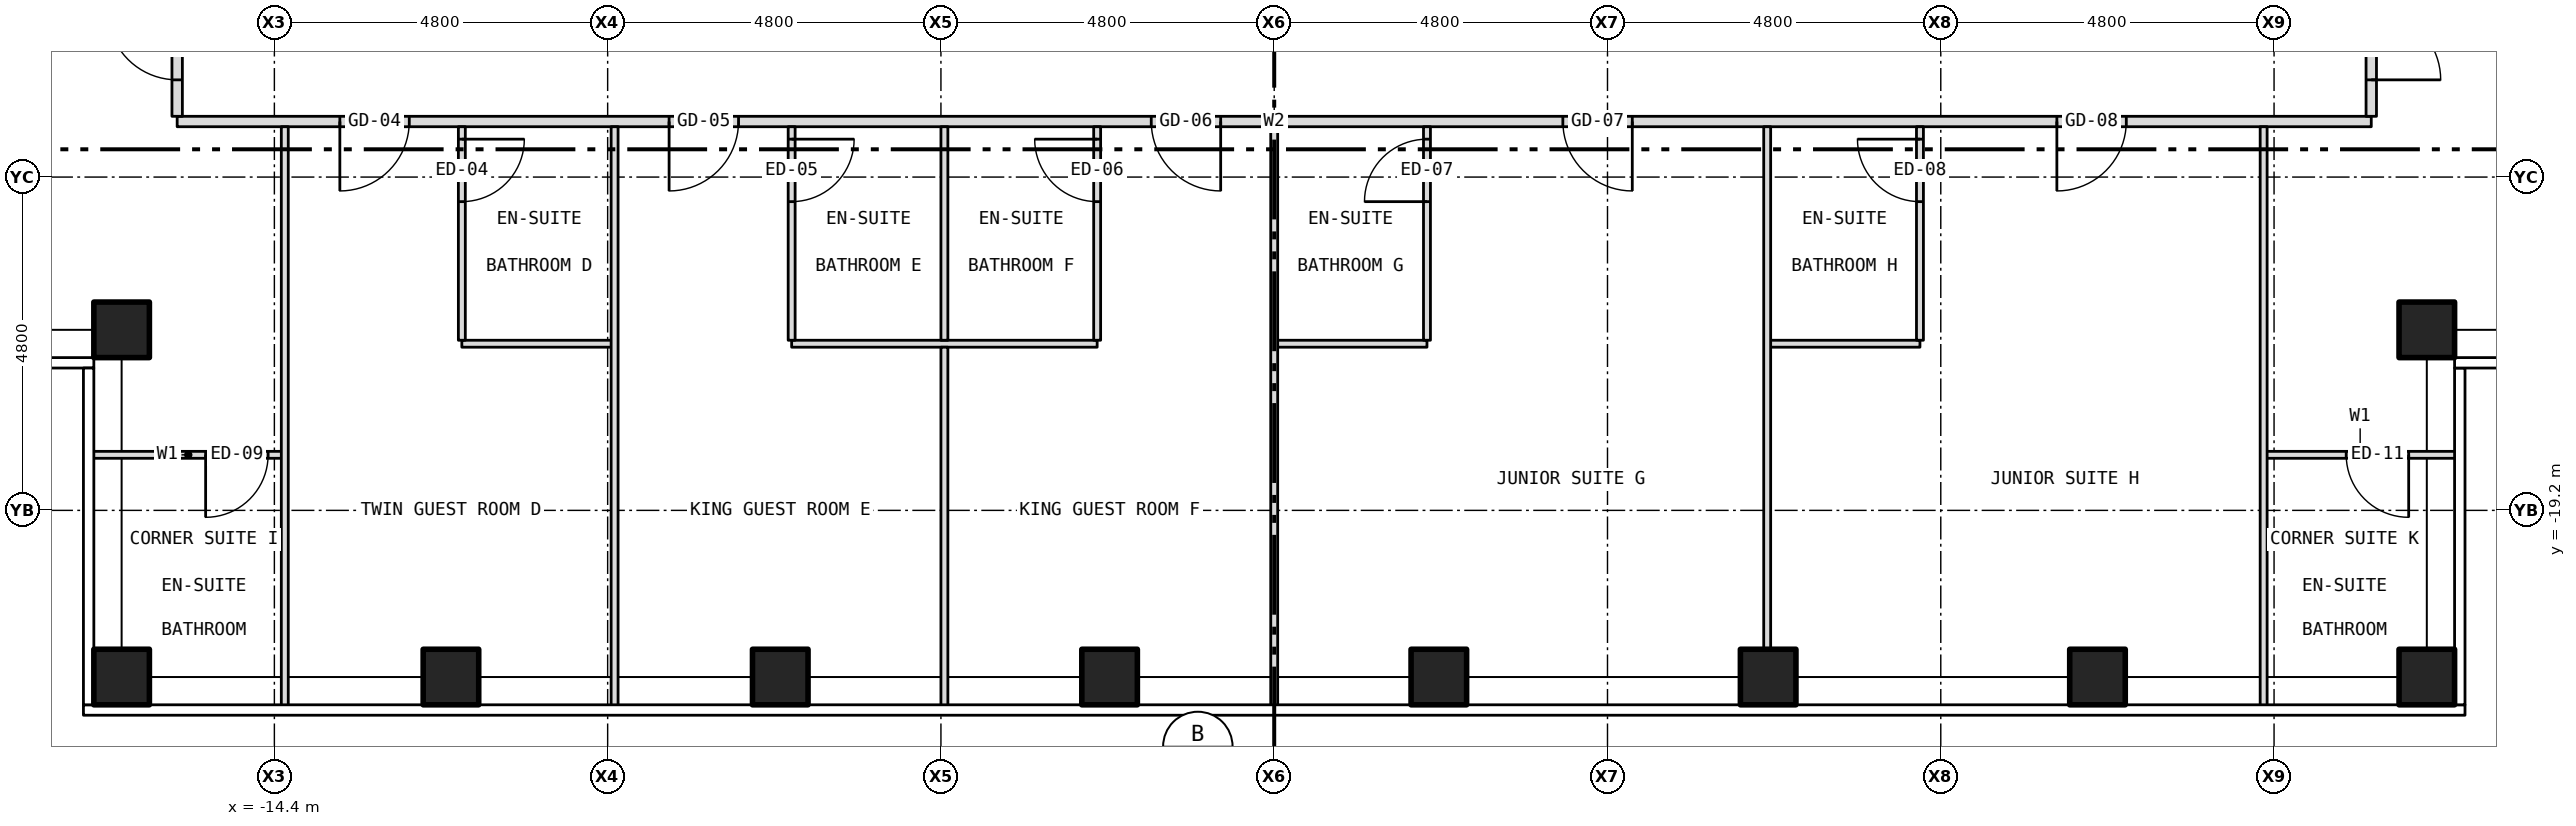
"""IFC4 building model, lengths in metres.
Left out: names, types, materials, properties, quantities, classifications, styles, units other than length and angle.
Written with IfcOpenShell. Run it as: python <this file> out.ifc"""

import sys

from ifc_helpers import new_model, si_unit, direction, frame, frame_2d, origin, origin_2d, place, context, subcontext, project, spatial, rectangle, hollow_rectangle, extrude, element, fill, save


model = new_model("IFC4")
c1 = context("Model", 3, precision=1e-05, world=origin(), true_north=direction((0.0, 1.0)))
c2 = subcontext(c1, "Body", "Model", "MODEL_VIEW")
j1 = project(units=[si_unit("LENGTHUNIT", "METRE"), si_unit("PLANEANGLEUNIT", "RADIAN")], contexts=[c1])
p1 = place(None, origin())
s1 = spatial("IfcSite", under=j1, at=p1, CompositionType="ELEMENT")
p2 = place(p1, origin())
s2 = spatial("IfcBuilding", under=s1, at=p2, CompositionType="ELEMENT")
p3 = place(p2, frame((0.0, 0.0, 148.0)))
s3 = spatial("IfcBuildingStorey", under=s2, at=p3, CompositionType="ELEMENT", Elevation=148.0)
for number, where, z_axis, x_axis in (
    (1, (-16.6, -21.6, -0.15), (0.0, 0.0, 1.0), (1.0, 0.0, 0.0)),
    (2, (-11.857, -21.6, -0.15), (0.0, 0.0, 1.0), (1.0, 0.0, 0.0)),
    (3, (-7.114, -21.6, -0.15), (0.0, 0.0, 1.0), (1.0, 0.0, 0.0)),
    (4, (-2.371, -21.6, -0.15), (0.0, 0.0, 1.0), (1.0, 0.0, 0.0)),
    (5, (2.371, -21.6, -0.15), (0.0, 0.0, 1.0), (1.0, 0.0, 0.0)),
    (6, (7.114, -21.6, -0.15), (0.0, 0.0, 1.0), (1.0, 0.0, 0.0)),
    (7, (11.857, -21.6, -0.15), (0.0, 0.0, 1.0), (1.0, 0.0, 0.0)),
    (8, (16.6, -21.6, -0.15), (0.0, 0.0, 1.0), (1.0, 0.0, 0.0)),
    (9, (-16.6, -16.6, -0.15), (0.0, 0.0, 1.0), (1.0, 0.0, 0.0)),
    (10, (16.6, -16.6, -0.15), (0.0, 0.0, 1.0), (1.0, 0.0, 0.0)),
):
    element("IfcColumn", number, at=place(p3, frame(where, z_axis=z_axis, x_axis=x_axis)), inside=s3, PredefinedType="COLUMN", context=c2, shape_type="SweptSolid", body=[
        extrude(hollow_rectangle(XDim=0.8, YDim=0.8, WallThickness=0.045, at=origin_2d()), origin(), (0.0, 0.0, 1.0), 3.5),
    ])
p4 = place(p3, frame((-17.03, -18.4, 0.0), z_axis=(0.0, 0.0, 1.0), x_axis=(1.0, 0.0, 0.0)))
e11 = element("IfcWall", 11, at=p4, inside=s3, PredefinedType="PARTITIONING", context=c2, shape_type="SweptSolid", body=[
    extrude(rectangle(XDim=2.78, YDim=0.1, at=frame_2d((1.39, 0.0))), origin(), (0.0, 0.0, 1.0), 3.35),
])
p5 = place(p4, frame((1.64, 0.0, 0.0)))
e12 = element("IfcOpeningElement", 12, at=p5, cuts=e11, PredefinedType="OPENING", context=c2, shape_type="SweptSolid", body=[
    extrude(rectangle(XDim=0.9, YDim=2.1, at=frame_2d((0.45, 1.05))), frame((0.0, 0.062, 0.0), z_axis=(0.0, -1.0, 0.0), x_axis=(1.0, 0.0, 0.0)), (0.0, 0.0, 1.0), 0.124),
])
p6 = place(p3, frame((14.25, -18.4, 0.0), z_axis=(0.0, 0.0, 1.0), x_axis=(1.0, 0.0, 0.0)))
e13 = element("IfcWall", 13, at=p6, inside=s3, PredefinedType="PARTITIONING", context=c2, shape_type="SweptSolid", body=[
    extrude(rectangle(XDim=2.78, YDim=0.1, at=frame_2d((1.39, 0.0))), origin(), (0.0, 0.0, 1.0), 3.35),
])
p7 = place(p6, frame((1.189, 0.0, 0.0)))
e14 = element("IfcOpeningElement", 14, at=p7, cuts=e13, PredefinedType="OPENING", context=c2, shape_type="SweptSolid", body=[
    extrude(rectangle(XDim=0.9, YDim=2.1, at=frame_2d((0.45, 1.05))), frame((0.0, 0.062, 0.0), z_axis=(0.0, -1.0, 0.0), x_axis=(1.0, 0.0, 0.0)), (0.0, 0.0, 1.0), 0.124),
])
p8 = place(p3, frame((-11.7, -16.8, 0.0), z_axis=(0.0, 0.0, 1.0), x_axis=(1.0, 0.0, 0.0)))
e15 = element("IfcWall", 15, at=p8, inside=s3, PredefinedType="PARTITIONING", context=c2, shape_type="SweptSolid", body=[
    extrude(rectangle(XDim=2.2, YDim=0.1, at=frame_2d((1.1, 0.0))), origin(), (0.0, 0.0, 1.0), 3.35),
])
p9 = place(p3, frame((-6.95, -16.8, 0.0), z_axis=(0.0, 0.0, 1.0), x_axis=(1.0, 0.0, 0.0)))
e16 = element("IfcWall", 16, at=p9, inside=s3, PredefinedType="PARTITIONING", context=c2, shape_type="SweptSolid", body=[
    extrude(rectangle(XDim=4.4, YDim=0.1, at=frame_2d((2.2, 0.0))), origin(), (0.0, 0.0, 1.0), 3.35),
])
for number, where, z_axis, x_axis in (
    (17, (0.0, -16.8, 0.0), (0.0, 0.0, 1.0), (1.0, 0.0, 0.0)),
    (18, (7.1, -16.8, 0.0), (0.0, 0.0, 1.0), (1.0, 0.0, 0.0)),
):
    element("IfcWall", number, at=place(p3, frame(where, z_axis=z_axis, x_axis=x_axis)), inside=s3, PredefinedType="PARTITIONING", context=c2, shape_type="SweptSolid", body=[
        extrude(rectangle(XDim=2.2, YDim=0.1, at=frame_2d((1.1, 0.0))), origin(), (0.0, 0.0, 1.0), 3.35),
    ])
p10 = place(p3, frame((-15.8, -13.6, 0.0), z_axis=(0.0, 0.0, 1.0), x_axis=(1.0, 0.0, 0.0)))
e19 = element("IfcWall", 19, at=p10, inside=s3, PredefinedType="PARTITIONING", context=c2, shape_type="SweptSolid", body=[
    extrude(rectangle(XDim=31.6, YDim=0.15, at=frame_2d((15.8, 0.0))), origin(), (0.0, 0.0, 1.0), 3.35),
])
p11 = place(p10, frame((2.343, 0.0, 0.0)))
e20 = element("IfcOpeningElement", 20, at=p11, cuts=e19, PredefinedType="OPENING", context=c2, shape_type="SweptSolid", body=[
    extrude(rectangle(XDim=1.0, YDim=2.1, at=frame_2d((0.5, 1.05))), frame((0.0, 0.087, 0.0), z_axis=(0.0, -1.0, 0.0), x_axis=(1.0, 0.0, 0.0)), (0.0, 0.0, 1.0), 0.174),
])
p12 = place(p10, frame((7.085, 0.0, 0.0)))
e21 = element("IfcOpeningElement", 21, at=p12, cuts=e19, PredefinedType="OPENING", context=c2, shape_type="SweptSolid", body=[
    extrude(rectangle(XDim=1.0, YDim=2.1, at=frame_2d((0.5, 1.05))), frame((0.0, 0.087, 0.0), z_axis=(0.0, -1.0, 0.0), x_axis=(1.0, 0.0, 0.0)), (0.0, 0.0, 1.0), 0.174),
])
p13 = place(p10, frame((14.029, 0.0, 0.0)))
e22 = element("IfcOpeningElement", 22, at=p13, cuts=e19, PredefinedType="OPENING", context=c2, shape_type="SweptSolid", body=[
    extrude(rectangle(XDim=1.0, YDim=2.1, at=frame_2d((0.5, 1.05))), frame((0.0, 0.087, 0.0), z_axis=(0.0, -1.0, 0.0), x_axis=(1.0, 0.0, 0.0)), (0.0, 0.0, 1.0), 0.174),
])
p14 = place(p10, frame((19.957, 0.0, 0.0)))
e23 = element("IfcOpeningElement", 23, at=p14, cuts=e19, PredefinedType="OPENING", context=c2, shape_type="SweptSolid", body=[
    extrude(rectangle(XDim=1.0, YDim=2.1, at=frame_2d((0.5, 1.05))), frame((0.0, 0.087, 0.0), z_axis=(0.0, -1.0, 0.0), x_axis=(1.0, 0.0, 0.0)), (0.0, 0.0, 1.0), 0.174),
])
p15 = place(p10, frame((27.072, 0.0, 0.0)))
e24 = element("IfcOpeningElement", 24, at=p15, cuts=e19, PredefinedType="OPENING", context=c2, shape_type="SweptSolid", body=[
    extrude(rectangle(XDim=1.0, YDim=2.1, at=frame_2d((0.5, 1.05))), frame((0.0, 0.087, 0.0), z_axis=(0.0, -1.0, 0.0), x_axis=(1.0, 0.0, 0.0)), (0.0, 0.0, 1.0), 0.174),
])
p16 = place(p3, frame((-15.8, -13.525, 0.0), z_axis=(0.0, 0.0, 1.0), x_axis=(0.0, 1.0, 0.0)))
e25 = element("IfcWall", 25, at=p16, inside=s3, PredefinedType="PARTITIONING", context=c2, shape_type="SweptSolid", body=[
    extrude(rectangle(XDim=2.605, YDim=0.15, at=frame_2d((1.302, 0.0))), origin(), (0.0, 0.0, 1.0), 3.35),
])
p17 = place(p16, frame((0.525, 0.0, 0.0)))
e26 = element("IfcOpeningElement", 26, at=p17, cuts=e25, PredefinedType="OPENING", context=c2, shape_type="SweptSolid", body=[
    extrude(rectangle(XDim=1.0, YDim=2.1, at=frame_2d((0.5, 1.05))), frame((0.0, 0.087, 0.0), z_axis=(0.0, -1.0, 0.0), x_axis=(1.0, 0.0, 0.0)), (0.0, 0.0, 1.0), 0.174),
])
p18 = place(p3, frame((-14.25, -22.03, 0.0), z_axis=(0.0, 0.0, 1.0), x_axis=(0.0, 1.0, 0.0)))
e27 = element("IfcWall", 27, at=p18, inside=s3, PredefinedType="PARTITIONING", context=c2, shape_type="SweptSolid", body=[
    extrude(rectangle(XDim=8.355, YDim=0.1, at=frame_2d((4.177, 0.0))), origin(), (0.0, 0.0, 1.0), 2.817),
])
p19 = place(p3, frame((-11.7, -16.75, 0.0), z_axis=(0.0, 0.0, 1.0), x_axis=(0.0, 1.0, 0.0)))
e28 = element("IfcWall", 28, at=p19, inside=s3, PredefinedType="PARTITIONING", context=c2, shape_type="SweptSolid", body=[
    extrude(rectangle(XDim=3.075, YDim=0.1, at=frame_2d((1.538, 0.0))), origin(), (0.0, 0.0, 1.0), 3.35),
])
p20 = place(p19, frame((1.996, 0.0, 0.0)))
e29 = element("IfcOpeningElement", 29, at=p20, cuts=e28, PredefinedType="OPENING", context=c2, shape_type="SweptSolid", body=[
    extrude(rectangle(XDim=0.9, YDim=2.1, at=frame_2d((0.45, 1.05))), frame((0.0, 0.062, 0.0), z_axis=(0.0, -1.0, 0.0), x_axis=(1.0, 0.0, 0.0)), (0.0, 0.0, 1.0), 0.124),
])
p21 = place(p3, frame((-9.5, -22.03, 0.0), z_axis=(0.0, 0.0, 1.0), x_axis=(0.0, 1.0, 0.0)))
e30 = element("IfcWall", 30, at=p21, inside=s3, PredefinedType="PARTITIONING", context=c2, shape_type="SweptSolid", body=[
    extrude(rectangle(XDim=8.355, YDim=0.1, at=frame_2d((4.177, 0.0))), origin(), (0.0, 0.0, 1.0), 2.728),
])
p22 = place(p3, frame((-6.95, -16.75, 0.0), z_axis=(0.0, 0.0, 1.0), x_axis=(0.0, 1.0, 0.0)))
e31 = element("IfcWall", 31, at=p22, inside=s3, PredefinedType="PARTITIONING", context=c2, shape_type="SweptSolid", body=[
    extrude(rectangle(XDim=3.075, YDim=0.1, at=frame_2d((1.538, 0.0))), origin(), (0.0, 0.0, 1.0), 3.35),
])
p23 = place(p22, frame((1.996, 0.0, 0.0)))
e32 = element("IfcOpeningElement", 32, at=p23, cuts=e31, PredefinedType="OPENING", context=c2, shape_type="SweptSolid", body=[
    extrude(rectangle(XDim=0.9, YDim=2.1, at=frame_2d((0.45, 1.05))), frame((0.0, 0.062, 0.0), z_axis=(0.0, -1.0, 0.0), x_axis=(1.0, 0.0, 0.0)), (0.0, 0.0, 1.0), 0.124),
])
p24 = place(p3, frame((-4.75, -22.03, 0.0), z_axis=(0.0, 0.0, 1.0), x_axis=(0.0, 1.0, 0.0)))
e33 = element("IfcWall", 33, at=p24, inside=s3, PredefinedType="PARTITIONING", context=c2, shape_type="SweptSolid", body=[
    extrude(rectangle(XDim=5.18, YDim=0.1, at=frame_2d((2.59, 0.0))), origin(), (0.0, 0.0, 1.0), 2.817),
])
p25 = place(p3, frame((-4.75, -16.75, 0.0), z_axis=(0.0, 0.0, 1.0), x_axis=(0.0, 1.0, 0.0)))
e34 = element("IfcWall", 34, at=p25, inside=s3, PredefinedType="PARTITIONING", context=c2, shape_type="SweptSolid", body=[
    extrude(rectangle(XDim=3.075, YDim=0.1, at=frame_2d((1.538, 0.0))), origin(), (0.0, 0.0, 1.0), 2.817),
])
p26 = place(p3, frame((-2.55, -16.75, 0.0), z_axis=(0.0, 0.0, 1.0), x_axis=(0.0, 1.0, 0.0)))
e35 = element("IfcWall", 35, at=p26, inside=s3, PredefinedType="PARTITIONING", context=c2, shape_type="SweptSolid", body=[
    extrude(rectangle(XDim=3.075, YDim=0.1, at=frame_2d((1.538, 0.0))), origin(), (0.0, 0.0, 1.0), 3.35),
])
p27 = place(p26, frame((1.996, 0.0, 0.0)))
e36 = element("IfcOpeningElement", 36, at=p27, cuts=e35, PredefinedType="OPENING", context=c2, shape_type="SweptSolid", body=[
    extrude(rectangle(XDim=0.9, YDim=2.1, at=frame_2d((0.45, 1.05))), frame((0.0, 0.062, 0.0), z_axis=(0.0, -1.0, 0.0), x_axis=(1.0, 0.0, 0.0)), (0.0, 0.0, 1.0), 0.124),
])
p28 = place(p3, frame((0.0, -22.03, 0.0), z_axis=(0.0, 0.0, 1.0), x_axis=(0.0, 1.0, 0.0)))
e37 = element("IfcWall", 37, at=p28, inside=s3, PredefinedType="PARTITIONING", context=c2, shape_type="SweptSolid", body=[
    extrude(rectangle(XDim=8.355, YDim=0.1, at=frame_2d((4.177, 0.0))), origin(), (0.0, 0.0, 1.0), 2.728),
])
p29 = place(p3, frame((2.2, -16.75, 0.0), z_axis=(0.0, 0.0, 1.0), x_axis=(0.0, 1.0, 0.0)))
e38 = element("IfcWall", 38, at=p29, inside=s3, PredefinedType="PARTITIONING", context=c2, shape_type="SweptSolid", body=[
    extrude(rectangle(XDim=3.075, YDim=0.1, at=frame_2d((1.538, 0.0))), origin(), (0.0, 0.0, 1.0), 3.35),
])
p30 = place(p29, frame((1.996, 0.0, 0.0)))
e39 = element("IfcOpeningElement", 39, at=p30, cuts=e38, PredefinedType="OPENING", context=c2, shape_type="SweptSolid", body=[
    extrude(rectangle(XDim=0.9, YDim=2.1, at=frame_2d((0.45, 1.05))), frame((0.0, 0.062, 0.0), z_axis=(0.0, -1.0, 0.0), x_axis=(1.0, 0.0, 0.0)), (0.0, 0.0, 1.0), 0.124),
])
p31 = place(p3, frame((7.1, -21.48, 0.0), z_axis=(0.0, 0.0, 1.0), x_axis=(0.0, 1.0, 0.0)))
e40 = element("IfcWall", 40, at=p31, inside=s3, PredefinedType="PARTITIONING", context=c2, shape_type="SweptSolid", body=[
    extrude(rectangle(XDim=7.805, YDim=0.1, at=frame_2d((3.902, 0.0))), origin(), (0.0, 0.0, 1.0), 3.35),
])
p32 = place(p3, frame((9.3, -16.75, 0.0), z_axis=(0.0, 0.0, 1.0), x_axis=(0.0, 1.0, 0.0)))
e41 = element("IfcWall", 41, at=p32, inside=s3, PredefinedType="PARTITIONING", context=c2, shape_type="SweptSolid", body=[
    extrude(rectangle(XDim=3.075, YDim=0.1, at=frame_2d((1.538, 0.0))), origin(), (0.0, 0.0, 1.0), 3.35),
])
p33 = place(p32, frame((1.996, 0.0, 0.0)))
e42 = element("IfcOpeningElement", 42, at=p33, cuts=e41, PredefinedType="OPENING", context=c2, shape_type="SweptSolid", body=[
    extrude(rectangle(XDim=0.9, YDim=2.1, at=frame_2d((0.45, 1.05))), frame((0.0, 0.062, 0.0), z_axis=(0.0, -1.0, 0.0), x_axis=(1.0, 0.0, 0.0)), (0.0, 0.0, 1.0), 0.124),
])
p34 = place(p3, frame((14.25, -22.03, 0.0), z_axis=(0.0, 0.0, 1.0), x_axis=(0.0, 1.0, 0.0)))
e43 = element("IfcWall", 43, at=p34, inside=s3, PredefinedType="PARTITIONING", context=c2, shape_type="SweptSolid", body=[
    extrude(rectangle(XDim=8.355, YDim=0.1, at=frame_2d((4.177, 0.0))), origin(), (0.0, 0.0, 1.0), 2.817),
])
p35 = place(p3, frame((15.8, -13.525, 0.0), z_axis=(0.0, 0.0, 1.0), x_axis=(0.0, 1.0, 0.0)))
e44 = element("IfcWall", 44, at=p35, inside=s3, PredefinedType="PARTITIONING", context=c2, shape_type="SweptSolid", body=[
    extrude(rectangle(XDim=2.605, YDim=0.15, at=frame_2d((1.302, 0.0))), origin(), (0.0, 0.0, 1.0), 3.35),
])
p36 = place(p35, frame((0.525, 0.0, 0.0)))
e45 = element("IfcOpeningElement", 45, at=p36, cuts=e44, PredefinedType="OPENING", context=c2, shape_type="SweptSolid", body=[
    extrude(rectangle(XDim=1.0, YDim=2.1, at=frame_2d((0.5, 1.05))), frame((0.0, 0.087, 0.0), z_axis=(0.0, -1.0, 0.0), x_axis=(1.0, 0.0, 0.0)), (0.0, 0.0, 1.0), 0.174),
])
p37 = place(p11, origin())
e46 = element("IfcDoor", 46, at=p37, inside=s3, OperationType="SINGLE_SWING_LEFT", PredefinedType="DOOR", context=c2, shape_type="SweptSolid", body=[
    extrude(rectangle(XDim=1.0, YDim=2.1, at=frame_2d((0.5, 1.05))), frame((0.0, 0.025, 0.0), z_axis=(0.0, -1.0, 0.0), x_axis=(1.0, 0.0, 0.0)), (0.0, 0.0, 1.0), 0.05),
])
fill(e20, e46)
p38 = place(p20, origin())
e47 = element("IfcDoor", 47, at=p38, inside=s3, OperationType="SINGLE_SWING_RIGHT", PredefinedType="DOOR", context=c2, shape_type="SweptSolid", body=[
    extrude(rectangle(XDim=0.9, YDim=2.1, at=frame_2d((0.45, 1.05))), frame((0.0, 0.025, 0.0), z_axis=(0.0, -1.0, 0.0), x_axis=(1.0, 0.0, 0.0)), (0.0, 0.0, 1.0), 0.05),
])
fill(e29, e47)
p39 = place(p12, origin())
e48 = element("IfcDoor", 48, at=p39, inside=s3, OperationType="SINGLE_SWING_LEFT", PredefinedType="DOOR", context=c2, shape_type="SweptSolid", body=[
    extrude(rectangle(XDim=1.0, YDim=2.1, at=frame_2d((0.5, 1.05))), frame((0.0, 0.025, 0.0), z_axis=(0.0, -1.0, 0.0), x_axis=(1.0, 0.0, 0.0)), (0.0, 0.0, 1.0), 0.05),
])
fill(e21, e48)
p40 = place(p23, origin())
e49 = element("IfcDoor", 49, at=p40, inside=s3, OperationType="SINGLE_SWING_RIGHT", PredefinedType="DOOR", context=c2, shape_type="SweptSolid", body=[
    extrude(rectangle(XDim=0.9, YDim=2.1, at=frame_2d((0.45, 1.05))), frame((0.0, 0.025, 0.0), z_axis=(0.0, -1.0, 0.0), x_axis=(1.0, 0.0, 0.0)), (0.0, 0.0, 1.0), 0.05),
])
fill(e32, e49)
p41 = place(p13, origin())
e50 = element("IfcDoor", 50, at=p41, inside=s3, OperationType="SINGLE_SWING_RIGHT", PredefinedType="DOOR", context=c2, shape_type="SweptSolid", body=[
    extrude(rectangle(XDim=1.0, YDim=2.1, at=frame_2d((0.5, 1.05))), frame((0.0, 0.025, 0.0), z_axis=(0.0, -1.0, 0.0), x_axis=(1.0, 0.0, 0.0)), (0.0, 0.0, 1.0), 0.05),
])
fill(e22, e50)
p42 = place(p27, origin())
e51 = element("IfcDoor", 51, at=p42, inside=s3, OperationType="SINGLE_SWING_RIGHT", PredefinedType="DOOR", context=c2, shape_type="SweptSolid", body=[
    extrude(rectangle(XDim=0.9, YDim=2.1, at=frame_2d((0.45, 1.05))), frame((0.0, 0.025, 0.0), z_axis=(0.0, -1.0, 0.0), x_axis=(1.0, 0.0, 0.0)), (0.0, 0.0, 1.0), 0.05),
])
fill(e36, e51)
p43 = place(p14, origin())
e52 = element("IfcDoor", 52, at=p43, inside=s3, OperationType="SINGLE_SWING_RIGHT", PredefinedType="DOOR", context=c2, shape_type="SweptSolid", body=[
    extrude(rectangle(XDim=1.0, YDim=2.1, at=frame_2d((0.5, 1.05))), frame((0.0, 0.025, 0.0), z_axis=(0.0, -1.0, 0.0), x_axis=(1.0, 0.0, 0.0)), (0.0, 0.0, 1.0), 0.05),
])
fill(e23, e52)
p44 = place(p30, origin())
e53 = element("IfcDoor", 53, at=p44, inside=s3, OperationType="SINGLE_SWING_LEFT", PredefinedType="DOOR", context=c2, shape_type="SweptSolid", body=[
    extrude(rectangle(XDim=0.9, YDim=2.1, at=frame_2d((0.45, 1.05))), frame((0.0, 0.025, 0.0), z_axis=(0.0, -1.0, 0.0), x_axis=(1.0, 0.0, 0.0)), (0.0, 0.0, 1.0), 0.05),
])
fill(e39, e53)
p45 = place(p15, origin())
e54 = element("IfcDoor", 54, at=p45, inside=s3, OperationType="SINGLE_SWING_LEFT", PredefinedType="DOOR", context=c2, shape_type="SweptSolid", body=[
    extrude(rectangle(XDim=1.0, YDim=2.1, at=frame_2d((0.5, 1.05))), frame((0.0, 0.025, 0.0), z_axis=(0.0, -1.0, 0.0), x_axis=(1.0, 0.0, 0.0)), (0.0, 0.0, 1.0), 0.05),
])
fill(e24, e54)
p46 = place(p33, origin())
e55 = element("IfcDoor", 55, at=p46, inside=s3, OperationType="SINGLE_SWING_RIGHT", PredefinedType="DOOR", context=c2, shape_type="SweptSolid", body=[
    extrude(rectangle(XDim=0.9, YDim=2.1, at=frame_2d((0.45, 1.05))), frame((0.0, 0.025, 0.0), z_axis=(0.0, -1.0, 0.0), x_axis=(1.0, 0.0, 0.0)), (0.0, 0.0, 1.0), 0.05),
])
fill(e42, e55)
p47 = place(p5, origin())
e56 = element("IfcDoor", 56, at=p47, inside=s3, OperationType="SINGLE_SWING_LEFT", PredefinedType="DOOR", context=c2, shape_type="SweptSolid", body=[
    extrude(rectangle(XDim=0.9, YDim=2.1, at=frame_2d((0.45, 1.05))), frame((0.0, 0.025, 0.0), z_axis=(0.0, -1.0, 0.0), x_axis=(1.0, 0.0, 0.0)), (0.0, 0.0, 1.0), 0.05),
])
fill(e12, e56)
p48 = place(p17, origin())
e57 = element("IfcDoor", 57, at=p48, inside=s3, OperationType="SINGLE_SWING_RIGHT", PredefinedType="DOOR", context=c2, shape_type="SweptSolid", body=[
    extrude(rectangle(XDim=1.0, YDim=2.1, at=frame_2d((0.5, 1.05))), frame((0.0, 0.025, 0.0), z_axis=(0.0, -1.0, 0.0), x_axis=(1.0, 0.0, 0.0)), (0.0, 0.0, 1.0), 0.05),
])
fill(e26, e57)
p49 = place(p7, origin())
e58 = element("IfcDoor", 58, at=p49, inside=s3, OperationType="SINGLE_SWING_RIGHT", PredefinedType="DOOR", context=c2, shape_type="SweptSolid", body=[
    extrude(rectangle(XDim=0.9, YDim=2.1, at=frame_2d((0.45, 1.05))), frame((0.0, 0.025, 0.0), z_axis=(0.0, -1.0, 0.0), x_axis=(1.0, 0.0, 0.0)), (0.0, 0.0, 1.0), 0.05),
])
fill(e14, e58)
p50 = place(p36, origin())
e59 = element("IfcDoor", 59, at=p50, inside=s3, OperationType="SINGLE_SWING_LEFT", PredefinedType="DOOR", context=c2, shape_type="SweptSolid", body=[
    extrude(rectangle(XDim=1.0, YDim=2.1, at=frame_2d((0.5, 1.05))), frame((0.0, 0.025, 0.0), z_axis=(0.0, -1.0, 0.0), x_axis=(1.0, 0.0, 0.0)), (0.0, 0.0, 1.0), 0.05),
])
fill(e45, e59)
save(model, sys.argv[1])
